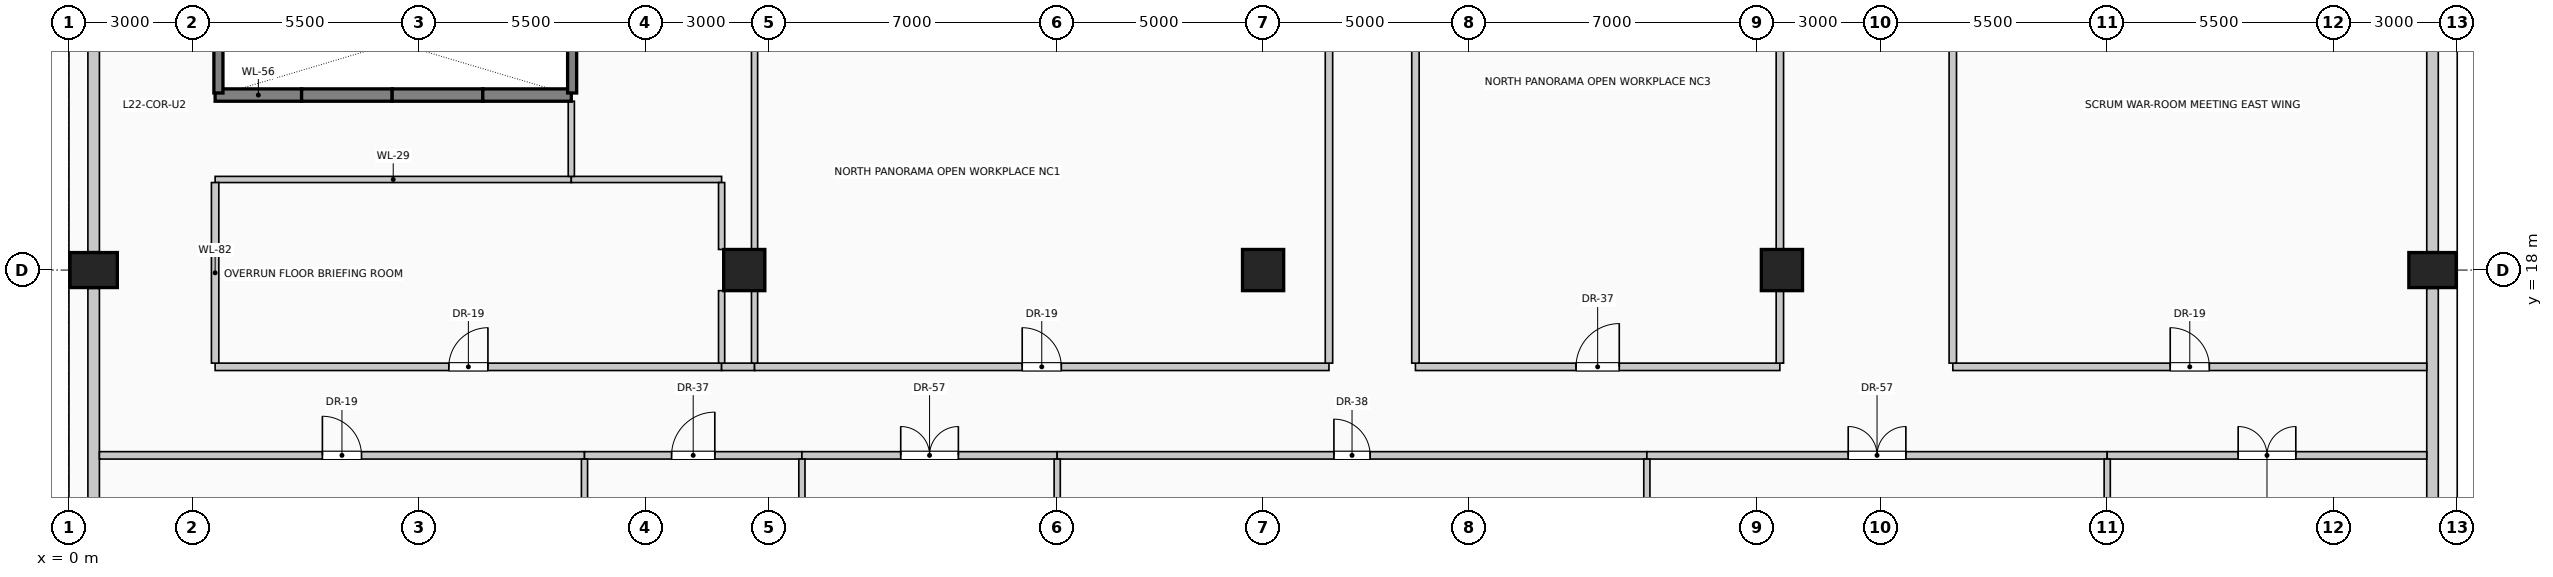
"""IFC4 building model, lengths in metres.
Left out: names, types, materials, properties, quantities, classifications, styles, units other than length and angle.
Written with IfcOpenShell. Run it as: python <this file> out.ifc"""

import sys

from ifc_helpers import new_model, si_unit, direction, frame, frame_2d, origin, origin_2d, place, context, subcontext, project, spatial, rectangle, circle, extrude, element, fill, save


model = new_model("IFC4")
c1 = context("Model", 3, precision=1e-05, world=origin(), true_north=direction((0.0, 1.0)))
c2 = subcontext(c1, "Body", "Model", "MODEL_VIEW")
j1 = project(units=[si_unit("LENGTHUNIT", "METRE"), si_unit("PLANEANGLEUNIT", "RADIAN")], contexts=[c1])
p1 = place(None, origin())
s1 = spatial("IfcSite", under=j1, at=p1, CompositionType="ELEMENT")
p2 = place(p1, origin())
s2 = spatial("IfcBuilding", under=s1, at=p2, CompositionType="ELEMENT")
p3 = place(p2, frame((0.0, 0.0, 92.6)))
s3 = spatial("IfcBuildingStorey", under=s2, at=p3, CompositionType="ELEMENT", Elevation=92.6)
for number, where, z_axis, x_axis in (
    (1, (0.6, 18.0, 0.0), (0.0, 0.0, 1.0), (0.0, 1.0, 0.0)),
    (2, (57.4, 18.0, 0.0), (0.0, 0.0, 1.0), (0.0, 1.0, 0.0)),
):
    element("IfcColumn", number, at=place(p3, frame(where, z_axis=z_axis, x_axis=x_axis)), inside=s3, PredefinedType="COLUMN", context=c2, shape_type="SweptSolid", body=[
        extrude(rectangle(XDim=0.85, YDim=1.15, at=origin_2d()), origin(), (0.0, 0.0, 1.0), 4.0),
    ])
for number, where, z_axis, x_axis in (
    (3, (16.4, 18.0, 0.0), (0.0, 0.0, 1.0), (1.0, 0.0, 0.0)),
    (4, (29.0, 18.0, 0.0), (0.0, 0.0, 1.0), (1.0, 0.0, 0.0)),
    (5, (41.6, 18.0, 0.0), (0.0, 0.0, 1.0), (1.0, 0.0, 0.0)),
):
    element("IfcColumn", number, at=place(p3, frame(where, z_axis=z_axis, x_axis=x_axis)), inside=s3, PredefinedType="COLUMN", context=c2, shape_type="SweptSolid", body=[
        extrude(circle(Radius=0.5, at=origin_2d()), origin(), (0.0, 0.0, 1.0), 4.0),
    ])
for number, where, z_axis, x_axis in (
    (6, (0.6, 10.445, 0.0), (0.0, 0.0, 1.0), (0.0, 1.0, 0.0)),
    (7, (0.6, 18.445, 0.0), (0.0, 0.0, 1.0), (0.0, 1.0, 0.0)),
    (8, (57.4, 17.555, 0.0), (0.0, 0.0, 1.0), (0.0, -1.0, 0.0)),
    (9, (57.4, 25.555, 0.0), (0.0, 0.0, 1.0), (0.0, -1.0, 0.0)),
):
    element("IfcWall", number, at=place(p3, frame(where, z_axis=z_axis, x_axis=x_axis)), inside=s3, PredefinedType="SOLIDWALL", context=c2, shape_type="SweptSolid", body=[
        extrude(rectangle(XDim=7.11, YDim=0.28, at=frame_2d((3.555, 0.0))), origin(), (0.0, 0.0, 1.0), 2.875),
    ])
p4 = place(p3, frame((5.65, 22.25, 0.0), z_axis=(0.0, 0.0, 1.0), x_axis=(-1.0, 0.0, 0.0)))
e10 = element("IfcWall", 10, at=p4, inside=s3, PredefinedType="SOLIDWALL", context=c2, shape_type="SweptSolid", body=[
    extrude(rectangle(XDim=2.1, YDim=0.3, at=frame_2d((1.05, 0.0))), origin(), (0.0, 0.0, 1.0), 4.0),
])
p5 = place(p3, frame((7.85, 22.25, 0.0), z_axis=(0.0, 0.0, 1.0), x_axis=(-1.0, 0.0, 0.0)))
e11 = element("IfcWall", 11, at=p5, inside=s3, PredefinedType="SOLIDWALL", context=c2, shape_type="SweptSolid", body=[
    extrude(rectangle(XDim=2.2, YDim=0.3, at=frame_2d((1.1, 0.0))), origin(), (0.0, 0.0, 1.0), 4.0),
])
p6 = place(p3, frame((10.05, 22.25, 0.0), z_axis=(0.0, 0.0, 1.0), x_axis=(-1.0, 0.0, 0.0)))
e12 = element("IfcWall", 12, at=p6, inside=s3, PredefinedType="SOLIDWALL", context=c2, shape_type="SweptSolid", body=[
    extrude(rectangle(XDim=2.2, YDim=0.3, at=frame_2d((1.1, 0.0))), origin(), (0.0, 0.0, 1.0), 4.0),
])
p7 = place(p3, frame((12.2, 22.25, 0.0), z_axis=(0.0, 0.0, 1.0), x_axis=(-1.0, 0.0, 0.0)))
e13 = element("IfcWall", 13, at=p7, inside=s3, PredefinedType="SOLIDWALL", context=c2, shape_type="SweptSolid", body=[
    extrude(rectangle(XDim=2.15, YDim=0.3, at=frame_2d((1.075, 0.0))), origin(), (0.0, 0.0, 1.0), 4.0),
])
for number, where, z_axis, x_axis in (
    (14, (3.63, 22.3, 0.0), (0.0, 0.0, 1.0), (0.0, 1.0, 0.0)),
    (15, (12.22, 22.3, 0.0), (0.0, 0.0, 1.0), (0.0, 1.0, 0.0)),
):
    element("IfcWall", number, at=place(p3, frame(where, z_axis=z_axis, x_axis=x_axis)), inside=s3, PredefinedType="SOLIDWALL", context=c2, shape_type="SweptSolid", body=[
        extrude(rectangle(XDim=2.45, YDim=0.22, at=frame_2d((1.225, 0.0))), origin(), (0.0, 0.0, 1.0), 4.0),
    ])
p8 = place(p3, frame((0.74, 13.5, 0.0), z_axis=(0.0, 0.0, 1.0), x_axis=(1.0, 0.0, 0.0)))
e16 = element("IfcWall", 16, at=p8, inside=s3, PredefinedType="PARTITIONING", context=c2, shape_type="SweptSolid", body=[
    extrude(rectangle(XDim=11.78, YDim=0.18, at=frame_2d((5.89, 0.0))), origin(), (0.0, 0.0, 1.0), 3.725),
])
p9 = place(p8, frame((5.415, 0.0, 0.0)))
e17 = element("IfcOpeningElement", 17, at=p9, cuts=e16, PredefinedType="OPENING", context=c2, shape_type="SweptSolid", body=[
    extrude(rectangle(XDim=0.95, YDim=2.15, at=frame_2d((0.475, 1.075))), frame((0.0, 0.1, 0.0), z_axis=(0.0, -1.0, 0.0), x_axis=(1.0, 0.0, 0.0)), (0.0, 0.0, 1.0), 0.2),
])
p10 = place(p3, frame((12.52, 13.5, 0.0), z_axis=(0.0, 0.0, 1.0), x_axis=(1.0, 0.0, 0.0)))
e18 = element("IfcWall", 18, at=p10, inside=s3, PredefinedType="PARTITIONING", context=c2, shape_type="SweptSolid", body=[
    extrude(rectangle(XDim=5.28, YDim=0.18, at=frame_2d((2.64, 0.0))), origin(), (0.0, 0.0, 1.0), 3.725),
])
p11 = place(p10, frame((2.115, 0.0, 0.0)))
e19 = element("IfcOpeningElement", 19, at=p11, cuts=e18, PredefinedType="OPENING", context=c2, shape_type="SweptSolid", body=[
    extrude(rectangle(XDim=1.05, YDim=2.15, at=frame_2d((0.525, 1.075))), frame((0.0, 0.1, 0.0), z_axis=(0.0, -1.0, 0.0), x_axis=(1.0, 0.0, 0.0)), (0.0, 0.0, 1.0), 0.2),
])
p12 = place(p3, frame((17.8, 13.5, 0.0), z_axis=(0.0, 0.0, 1.0), x_axis=(1.0, 0.0, 0.0)))
e20 = element("IfcWall", 20, at=p12, inside=s3, PredefinedType="PARTITIONING", context=c2, shape_type="SweptSolid", body=[
    extrude(rectangle(XDim=6.2, YDim=0.18, at=frame_2d((3.1, 0.0))), origin(), (0.0, 0.0, 1.0), 3.725),
])
p13 = place(p12, frame((2.4, 0.0, 0.0)))
e21 = element("IfcOpeningElement", 21, at=p13, cuts=e20, PredefinedType="OPENING", context=c2, shape_type="SweptSolid", body=[
    extrude(rectangle(XDim=1.4, YDim=2.2, at=frame_2d((0.7, 1.1))), frame((0.0, 0.1, 0.0), z_axis=(0.0, -1.0, 0.0), x_axis=(1.0, 0.0, 0.0)), (0.0, 0.0, 1.0), 0.2),
])
p14 = place(p3, frame((24.0, 13.5, 0.0), z_axis=(0.0, 0.0, 1.0), x_axis=(1.0, 0.0, 0.0)))
e22 = element("IfcWall", 22, at=p14, inside=s3, PredefinedType="PARTITIONING", context=c2, shape_type="SweptSolid", body=[
    extrude(rectangle(XDim=14.32, YDim=0.18, at=frame_2d((7.16, 0.0))), origin(), (0.0, 0.0, 1.0), 3.725),
])
p15 = place(p14, frame((6.72, 0.0, 0.0)))
e23 = element("IfcOpeningElement", 23, at=p15, cuts=e22, PredefinedType="OPENING", context=c2, shape_type="SweptSolid", body=[
    extrude(rectangle(XDim=0.88, YDim=2.1, at=frame_2d((0.44, 1.05))), frame((0.0, 0.1, 0.0), z_axis=(0.0, -1.0, 0.0), x_axis=(1.0, 0.0, 0.0)), (0.0, 0.0, 1.0), 0.2),
])
p16 = place(p3, frame((38.32, 13.5, 0.0), z_axis=(0.0, 0.0, 1.0), x_axis=(1.0, 0.0, 0.0)))
e24 = element("IfcWall", 24, at=p16, inside=s3, PredefinedType="PARTITIONING", context=c2, shape_type="SweptSolid", body=[
    extrude(rectangle(XDim=11.18, YDim=0.18, at=frame_2d((5.59, 0.0))), origin(), (0.0, 0.0, 1.0), 3.725),
])
p17 = place(p16, frame((4.89, 0.0, 0.0)))
e25 = element("IfcOpeningElement", 25, at=p17, cuts=e24, PredefinedType="OPENING", context=c2, shape_type="SweptSolid", body=[
    extrude(rectangle(XDim=1.4, YDim=2.2, at=frame_2d((0.7, 1.1))), frame((0.0, 0.1, 0.0), z_axis=(0.0, -1.0, 0.0), x_axis=(1.0, 0.0, 0.0)), (0.0, 0.0, 1.0), 0.2),
])
p18 = place(p3, frame((49.5, 13.5, 0.0), z_axis=(0.0, 0.0, 1.0), x_axis=(1.0, 0.0, 0.0)))
e26 = element("IfcWall", 26, at=p18, inside=s3, PredefinedType="PARTITIONING", context=c2, shape_type="SweptSolid", body=[
    extrude(rectangle(XDim=7.76, YDim=0.18, at=frame_2d((3.88, 0.0))), origin(), (0.0, 0.0, 1.0), 3.725),
])
p19 = place(p18, frame((3.18, 0.0, 0.0)))
e27 = element("IfcOpeningElement", 27, at=p19, cuts=e26, PredefinedType="OPENING", context=c2, shape_type="SweptSolid", body=[
    extrude(rectangle(XDim=1.4, YDim=2.2, at=frame_2d((0.7, 1.1))), frame((0.0, 0.1, 0.0), z_axis=(0.0, -1.0, 0.0), x_axis=(1.0, 0.0, 0.0)), (0.0, 0.0, 1.0), 0.2),
])
p20 = place(p3, frame((3.55, 15.65, 0.0), z_axis=(0.0, 0.0, 1.0), x_axis=(1.0, 0.0, 0.0)))
e28 = element("IfcWall", 28, at=p20, inside=s3, PredefinedType="PARTITIONING", context=c2, shape_type="SweptSolid", body=[
    extrude(rectangle(XDim=12.3, YDim=0.18, at=frame_2d((6.15, 0.0))), origin(), (0.0, 0.0, 1.0), 3.725),
])
p21 = place(p20, frame((5.675, 0.0, 0.0)))
e29 = element("IfcOpeningElement", 29, at=p21, cuts=e28, PredefinedType="OPENING", context=c2, shape_type="SweptSolid", body=[
    extrude(rectangle(XDim=0.95, YDim=2.15, at=frame_2d((0.475, 1.075))), frame((0.0, 0.1, 0.0), z_axis=(0.0, -1.0, 0.0), x_axis=(1.0, 0.0, 0.0)), (0.0, 0.0, 1.0), 0.2),
])
p22 = place(p3, frame((15.85, 15.65, 0.0), z_axis=(0.0, 0.0, 1.0), x_axis=(1.0, 0.0, 0.0)))
e30 = element("IfcWall", 30, at=p22, inside=s3, PredefinedType="PARTITIONING", context=c2, shape_type="SweptSolid", body=[
    extrude(rectangle(XDim=0.8, YDim=0.18, at=frame_2d((0.4, 0.0))), origin(), (0.0, 0.0, 1.0), 3.725),
])
p23 = place(p3, frame((16.65, 15.65, 0.0), z_axis=(0.0, 0.0, 1.0), x_axis=(1.0, 0.0, 0.0)))
e31 = element("IfcWall", 31, at=p23, inside=s3, PredefinedType="PARTITIONING", context=c2, shape_type="SweptSolid", body=[
    extrude(rectangle(XDim=13.95, YDim=0.18, at=frame_2d((6.975, 0.0))), origin(), (0.0, 0.0, 1.0), 3.725),
])
p24 = place(p23, frame((6.5, 0.0, 0.0)))
e32 = element("IfcOpeningElement", 32, at=p24, cuts=e31, PredefinedType="OPENING", context=c2, shape_type="SweptSolid", body=[
    extrude(rectangle(XDim=0.95, YDim=2.15, at=frame_2d((0.475, 1.075))), frame((0.0, 0.1, 0.0), z_axis=(0.0, -1.0, 0.0), x_axis=(1.0, 0.0, 0.0)), (0.0, 0.0, 1.0), 0.2),
])
p25 = place(p3, frame((32.7, 15.65, 0.0), z_axis=(0.0, 0.0, 1.0), x_axis=(1.0, 0.0, 0.0)))
e33 = element("IfcWall", 33, at=p25, inside=s3, PredefinedType="PARTITIONING", context=c2, shape_type="SweptSolid", body=[
    extrude(rectangle(XDim=8.85, YDim=0.18, at=frame_2d((4.425, 0.0))), origin(), (0.0, 0.0, 1.0), 3.725),
])
p26 = place(p25, frame((3.9, 0.0, 0.0)))
e34 = element("IfcOpeningElement", 34, at=p26, cuts=e33, PredefinedType="OPENING", context=c2, shape_type="SweptSolid", body=[
    extrude(rectangle(XDim=1.05, YDim=2.15, at=frame_2d((0.525, 1.075))), frame((0.0, 0.1, 0.0), z_axis=(0.0, -1.0, 0.0), x_axis=(1.0, 0.0, 0.0)), (0.0, 0.0, 1.0), 0.2),
])
p27 = place(p3, frame((45.75, 15.65, 0.0), z_axis=(0.0, 0.0, 1.0), x_axis=(1.0, 0.0, 0.0)))
e35 = element("IfcWall", 35, at=p27, inside=s3, PredefinedType="PARTITIONING", context=c2, shape_type="SweptSolid", body=[
    extrude(rectangle(XDim=11.51, YDim=0.18, at=frame_2d((5.755, 0.0))), origin(), (0.0, 0.0, 1.0), 3.725),
])
p28 = place(p27, frame((5.28, 0.0, 0.0)))
e36 = element("IfcOpeningElement", 36, at=p28, cuts=e35, PredefinedType="OPENING", context=c2, shape_type="SweptSolid", body=[
    extrude(rectangle(XDim=0.95, YDim=2.15, at=frame_2d((0.475, 1.075))), frame((0.0, 0.1, 0.0), z_axis=(0.0, -1.0, 0.0), x_axis=(1.0, 0.0, 0.0)), (0.0, 0.0, 1.0), 0.2),
])
p29 = place(p3, frame((3.55, 20.2, 0.0), z_axis=(0.0, 0.0, 1.0), x_axis=(1.0, 0.0, 0.0)))
e37 = element("IfcWall", 37, at=p29, inside=s3, PredefinedType="PARTITIONING", context=c2, shape_type="SweptSolid", body=[
    extrude(rectangle(XDim=8.65, YDim=0.15, at=frame_2d((4.325, 0.0))), origin(), (0.0, 0.0, 1.0), 3.725),
])
p30 = place(p3, frame((12.2, 20.2, 0.0), z_axis=(0.0, 0.0, 1.0), x_axis=(1.0, 0.0, 0.0)))
e38 = element("IfcWall", 38, at=p30, inside=s3, PredefinedType="PARTITIONING", context=c2, shape_type="SweptSolid", body=[
    extrude(rectangle(XDim=3.65, YDim=0.15, at=frame_2d((1.825, 0.0))), origin(), (0.0, 0.0, 1.0), 3.725),
])
p31 = place(p3, frame((3.55, 15.74, 0.0), z_axis=(0.0, 0.0, 1.0), x_axis=(0.0, 1.0, 0.0)))
e39 = element("IfcWall", 39, at=p31, inside=s3, PredefinedType="PARTITIONING", context=c2, shape_type="SweptSolid", body=[
    extrude(rectangle(XDim=4.385, YDim=0.18, at=frame_2d((2.192, 0.0))), origin(), (0.0, 0.0, 1.0), 3.725),
])
p32 = place(p3, frame((12.2, 20.275, 0.0), z_axis=(0.0, 0.0, 1.0), x_axis=(0.0, 1.0, 0.0)))
e40 = element("IfcWall", 40, at=p32, inside=s3, PredefinedType="PARTITIONING", context=c2, shape_type="SweptSolid", body=[
    extrude(rectangle(XDim=1.825, YDim=0.15, at=frame_2d((0.913, 0.0))), origin(), (0.0, 0.0, 1.0), 3.725),
])
p33 = place(p3, frame((12.52, 0.74, 0.0), z_axis=(0.0, 0.0, 1.0), x_axis=(0.0, 1.0, 0.0)))
e41 = element("IfcWall", 41, at=p33, inside=s3, PredefinedType="PARTITIONING", context=c2, shape_type="SweptSolid", body=[
    extrude(rectangle(XDim=12.67, YDim=0.15, at=frame_2d((6.335, 0.0))), origin(), (0.0, 0.0, 1.0), 3.725),
])
p34 = place(p3, frame((15.85, 15.74, 0.0), z_axis=(0.0, 0.0, 1.0), x_axis=(0.0, 1.0, 0.0)))
e42 = element("IfcWall", 42, at=p34, inside=s3, PredefinedType="PARTITIONING", context=c2, shape_type="SweptSolid", body=[
    extrude(rectangle(XDim=1.76, YDim=0.15, at=frame_2d((0.88, 0.0))), origin(), (0.0, 0.0, 1.0), 3.725),
])
p35 = place(p3, frame((15.85, 18.5, 0.0), z_axis=(0.0, 0.0, 1.0), x_axis=(0.0, 1.0, 0.0)))
e43 = element("IfcWall", 43, at=p35, inside=s3, PredefinedType="PARTITIONING", context=c2, shape_type="SweptSolid", body=[
    extrude(rectangle(XDim=1.625, YDim=0.15, at=frame_2d((0.812, 0.0))), origin(), (0.0, 0.0, 1.0), 3.725),
])
p36 = place(p3, frame((16.65, 15.74, 0.0), z_axis=(0.0, 0.0, 1.0), x_axis=(0.0, 1.0, 0.0)))
e44 = element("IfcWall", 44, at=p36, inside=s3, PredefinedType="PARTITIONING", context=c2, shape_type="SweptSolid", body=[
    extrude(rectangle(XDim=1.76, YDim=0.15, at=frame_2d((0.88, 0.0))), origin(), (0.0, 0.0, 1.0), 3.07),
])
p37 = place(p3, frame((16.65, 18.5, 0.0), z_axis=(0.0, 0.0, 1.0), x_axis=(0.0, 1.0, 0.0)))
e45 = element("IfcWall", 45, at=p37, inside=s3, PredefinedType="PARTITIONING", context=c2, shape_type="SweptSolid", body=[
    extrude(rectangle(XDim=6.425, YDim=0.15, at=frame_2d((3.212, 0.0))), origin(), (0.0, 0.0, 1.0), 3.07),
])
p38 = place(p3, frame((17.8, 0.74, 0.0), z_axis=(0.0, 0.0, 1.0), x_axis=(0.0, 1.0, 0.0)))
e46 = element("IfcWall", 46, at=p38, inside=s3, PredefinedType="PARTITIONING", context=c2, shape_type="SweptSolid", body=[
    extrude(rectangle(XDim=12.67, YDim=0.15, at=frame_2d((6.335, 0.0))), origin(), (0.0, 0.0, 1.0), 3.725),
])
p39 = place(p3, frame((24.0, 1.3, 0.0), z_axis=(0.0, 0.0, 1.0), x_axis=(0.0, 1.0, 0.0)))
e47 = element("IfcWall", 47, at=p39, inside=s3, PredefinedType="PARTITIONING", context=c2, shape_type="SweptSolid", body=[
    extrude(rectangle(XDim=12.11, YDim=0.15, at=frame_2d((6.055, 0.0))), origin(), (0.0, 0.0, 1.0), 3.725),
])
p40 = place(p3, frame((30.6, 15.74, 0.0), z_axis=(0.0, 0.0, 1.0), x_axis=(0.0, 1.0, 0.0)))
e48 = element("IfcWall", 48, at=p40, inside=s3, PredefinedType="PARTITIONING", context=c2, shape_type="SweptSolid", body=[
    extrude(rectangle(XDim=9.185, YDim=0.18, at=frame_2d((4.593, 0.0))), origin(), (0.0, 0.0, 1.0), 3.725),
])
p41 = place(p3, frame((32.7, 15.74, 0.0), z_axis=(0.0, 0.0, 1.0), x_axis=(0.0, 1.0, 0.0)))
e49 = element("IfcWall", 49, at=p41, inside=s3, PredefinedType="PARTITIONING", context=c2, shape_type="SweptSolid", body=[
    extrude(rectangle(XDim=11.17, YDim=0.18, at=frame_2d((5.585, 0.0))), origin(), (0.0, 0.0, 1.0), 3.725),
])
p42 = place(p3, frame((38.32, 0.74, 0.0), z_axis=(0.0, 0.0, 1.0), x_axis=(0.0, 1.0, 0.0)))
e50 = element("IfcWall", 50, at=p42, inside=s3, PredefinedType="PARTITIONING", context=c2, shape_type="SweptSolid", body=[
    extrude(rectangle(XDim=12.67, YDim=0.15, at=frame_2d((6.335, 0.0))), origin(), (0.0, 0.0, 1.0), 3.725),
])
p43 = place(p3, frame((41.55, 15.74, 0.0), z_axis=(0.0, 0.0, 1.0), x_axis=(0.0, 1.0, 0.0)))
e51 = element("IfcWall", 51, at=p43, inside=s3, PredefinedType="PARTITIONING", context=c2, shape_type="SweptSolid", body=[
    extrude(rectangle(XDim=1.76, YDim=0.18, at=frame_2d((0.88, 0.0))), origin(), (0.0, 0.0, 1.0), 3.07),
])
p44 = place(p3, frame((41.55, 18.5, 0.0), z_axis=(0.0, 0.0, 1.0), x_axis=(0.0, 1.0, 0.0)))
e52 = element("IfcWall", 52, at=p44, inside=s3, PredefinedType="PARTITIONING", context=c2, shape_type="SweptSolid", body=[
    extrude(rectangle(XDim=8.425, YDim=0.18, at=frame_2d((4.212, 0.0))), origin(), (0.0, 0.0, 1.0), 3.07),
])
p45 = place(p3, frame((45.75, 15.74, 0.0), z_axis=(0.0, 0.0, 1.0), x_axis=(0.0, 1.0, 0.0)))
e53 = element("IfcWall", 53, at=p45, inside=s3, PredefinedType="PARTITIONING", context=c2, shape_type="SweptSolid", body=[
    extrude(rectangle(XDim=16.535, YDim=0.18, at=frame_2d((8.268, 0.0))), origin(), (0.0, 0.0, 1.0), 3.725),
])
p46 = place(p3, frame((49.5, 1.175, 0.0), z_axis=(0.0, 0.0, 1.0), x_axis=(0.0, 1.0, 0.0)))
e54 = element("IfcWall", 54, at=p46, inside=s3, PredefinedType="PARTITIONING", context=c2, shape_type="SweptSolid", body=[
    extrude(rectangle(XDim=12.235, YDim=0.15, at=frame_2d((6.117, 0.0))), origin(), (0.0, 0.0, 1.0), 3.725),
])
p47 = place(p9, origin())
e55 = element("IfcDoor", 55, at=p47, inside=s3, OperationType="SINGLE_SWING_LEFT", PredefinedType="DOOR", context=c2, shape_type="SweptSolid", body=[
    extrude(rectangle(XDim=0.95, YDim=2.15, at=frame_2d((0.475, 1.075))), frame((0.0, 0.025, 0.0), z_axis=(0.0, -1.0, 0.0), x_axis=(1.0, 0.0, 0.0)), (0.0, 0.0, 1.0), 0.05),
])
fill(e17, e55)
p48 = place(p11, origin())
e56 = element("IfcDoor", 56, at=p48, inside=s3, OperationType="SINGLE_SWING_RIGHT", PredefinedType="DOOR", context=c2, shape_type="SweptSolid", body=[
    extrude(rectangle(XDim=1.05, YDim=2.15, at=frame_2d((0.525, 1.075))), frame((0.0, 0.025, 0.0), z_axis=(0.0, -1.0, 0.0), x_axis=(1.0, 0.0, 0.0)), (0.0, 0.0, 1.0), 0.05),
])
fill(e19, e56)
p49 = place(p13, origin())
e57 = element("IfcDoor", 57, at=p49, inside=s3, OperationType="DOUBLE_DOOR_SINGLE_SWING", PredefinedType="DOOR", context=c2, shape_type="SweptSolid", body=[
    extrude(rectangle(XDim=1.4, YDim=2.2, at=frame_2d((0.7, 1.1))), frame((0.0, 0.025, 0.0), z_axis=(0.0, -1.0, 0.0), x_axis=(1.0, 0.0, 0.0)), (0.0, 0.0, 1.0), 0.05),
])
fill(e21, e57)
p50 = place(p15, origin())
e58 = element("IfcDoor", 58, at=p50, inside=s3, OperationType="SINGLE_SWING_LEFT", PredefinedType="DOOR", context=c2, shape_type="SweptSolid", body=[
    extrude(rectangle(XDim=0.88, YDim=2.1, at=frame_2d((0.44, 1.05))), frame((0.0, 0.025, 0.0), z_axis=(0.0, -1.0, 0.0), x_axis=(1.0, 0.0, 0.0)), (0.0, 0.0, 1.0), 0.05),
])
fill(e23, e58)
p51 = place(p17, origin())
e59 = element("IfcDoor", 59, at=p51, inside=s3, OperationType="DOUBLE_DOOR_SINGLE_SWING", PredefinedType="DOOR", context=c2, shape_type="SweptSolid", body=[
    extrude(rectangle(XDim=1.4, YDim=2.2, at=frame_2d((0.7, 1.1))), frame((0.0, 0.025, 0.0), z_axis=(0.0, -1.0, 0.0), x_axis=(1.0, 0.0, 0.0)), (0.0, 0.0, 1.0), 0.05),
])
fill(e25, e59)
p52 = place(p19, origin())
e60 = element("IfcDoor", 60, at=p52, inside=s3, OperationType="DOUBLE_DOOR_SINGLE_SWING", PredefinedType="DOOR", context=c2, shape_type="SweptSolid", body=[
    extrude(rectangle(XDim=1.4, YDim=2.2, at=frame_2d((0.7, 1.1))), frame((0.0, 0.025, 0.0), z_axis=(0.0, -1.0, 0.0), x_axis=(1.0, 0.0, 0.0)), (0.0, 0.0, 1.0), 0.05),
])
fill(e27, e60)
p53 = place(p21, origin())
e61 = element("IfcDoor", 61, at=p53, inside=s3, OperationType="SINGLE_SWING_RIGHT", PredefinedType="DOOR", context=c2, shape_type="SweptSolid", body=[
    extrude(rectangle(XDim=0.95, YDim=2.15, at=frame_2d((0.475, 1.075))), frame((0.0, 0.025, 0.0), z_axis=(0.0, -1.0, 0.0), x_axis=(1.0, 0.0, 0.0)), (0.0, 0.0, 1.0), 0.05),
])
fill(e29, e61)
p54 = place(p24, origin())
e62 = element("IfcDoor", 62, at=p54, inside=s3, OperationType="SINGLE_SWING_LEFT", PredefinedType="DOOR", context=c2, shape_type="SweptSolid", body=[
    extrude(rectangle(XDim=0.95, YDim=2.15, at=frame_2d((0.475, 1.075))), frame((0.0, 0.025, 0.0), z_axis=(0.0, -1.0, 0.0), x_axis=(1.0, 0.0, 0.0)), (0.0, 0.0, 1.0), 0.05),
])
fill(e32, e62)
p55 = place(p26, origin())
e63 = element("IfcDoor", 63, at=p55, inside=s3, OperationType="SINGLE_SWING_RIGHT", PredefinedType="DOOR", context=c2, shape_type="SweptSolid", body=[
    extrude(rectangle(XDim=1.05, YDim=2.15, at=frame_2d((0.525, 1.075))), frame((0.0, 0.025, 0.0), z_axis=(0.0, -1.0, 0.0), x_axis=(1.0, 0.0, 0.0)), (0.0, 0.0, 1.0), 0.05),
])
fill(e34, e63)
p56 = place(p28, origin())
e64 = element("IfcDoor", 64, at=p56, inside=s3, OperationType="SINGLE_SWING_LEFT", PredefinedType="DOOR", context=c2, shape_type="SweptSolid", body=[
    extrude(rectangle(XDim=0.95, YDim=2.15, at=frame_2d((0.475, 1.075))), frame((0.0, 0.025, 0.0), z_axis=(0.0, -1.0, 0.0), x_axis=(1.0, 0.0, 0.0)), (0.0, 0.0, 1.0), 0.05),
])
fill(e36, e64)
save(model, sys.argv[1])
